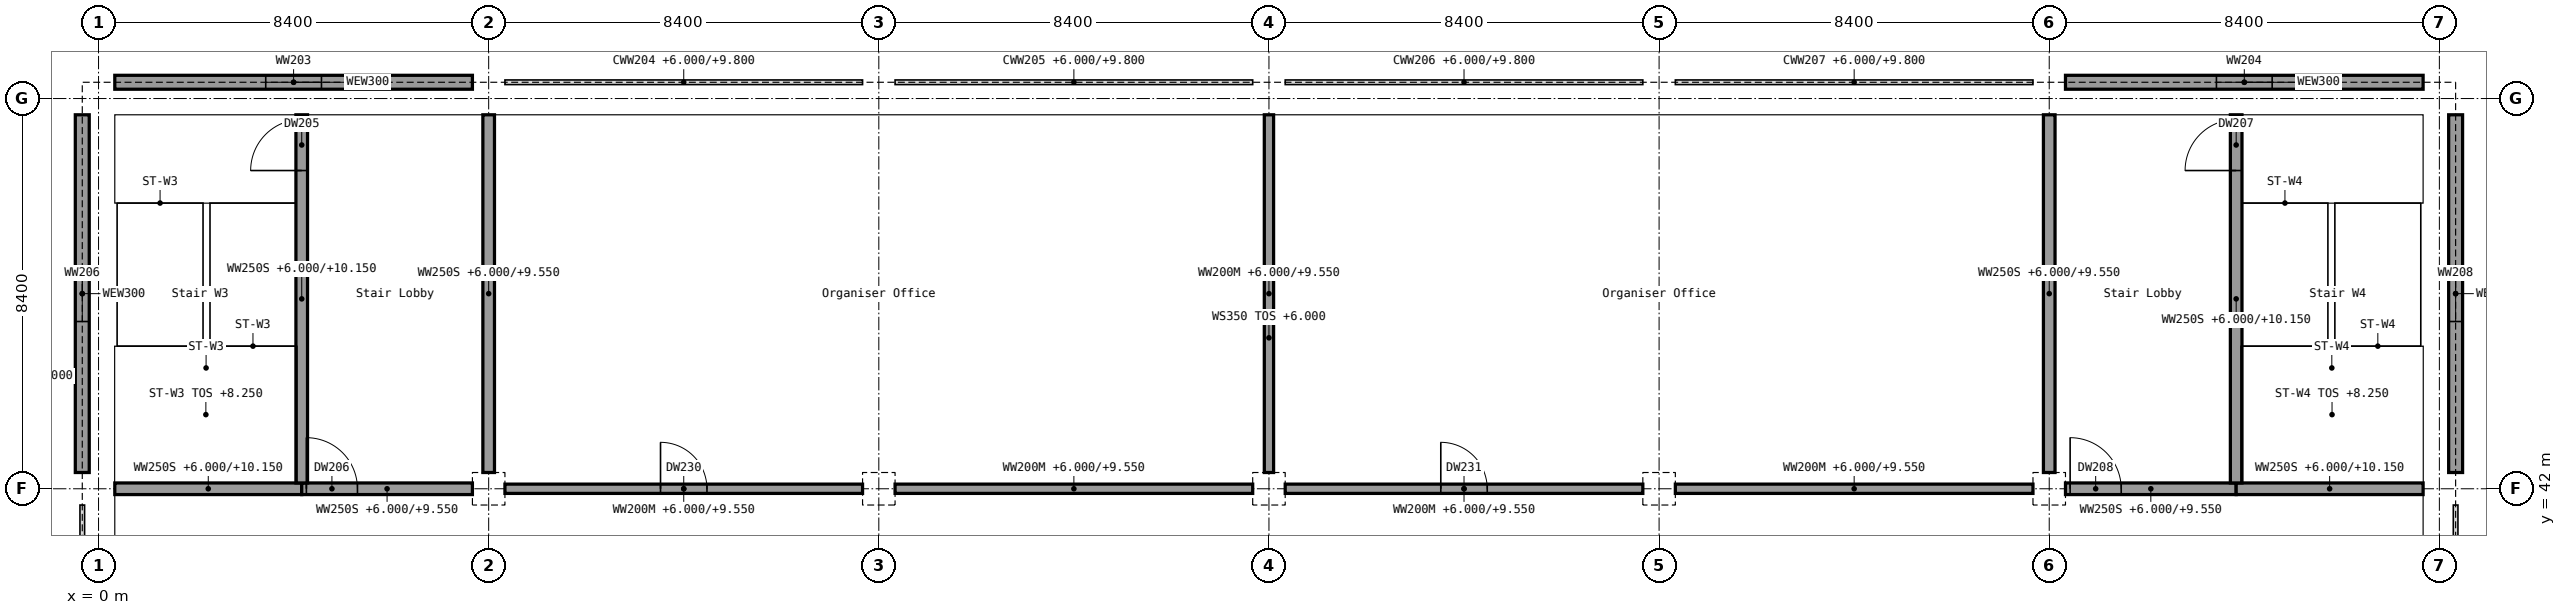
"""IFC4 building model, lengths in metres.
Left out: names, types, materials, properties, quantities, classifications, styles, units other than length and angle.
Written with IfcOpenShell. Run it as: python <this file> out.ifc"""

import sys

from ifc_helpers import new_model, si_unit, direction, frame, frame_2d, origin, origin_2d, place, context, subcontext, project, spatial, rectangle, extrude, element, fill, save


model = new_model("IFC4")
c1 = context("Model", 3, precision=1e-05, world=origin(), true_north=direction((0.0, 1.0)))
c2 = subcontext(c1, "Body", "Model", "MODEL_VIEW")
j1 = project(units=[si_unit("LENGTHUNIT", "METRE"), si_unit("PLANEANGLEUNIT", "RADIAN")], contexts=[c1])
p1 = place(None, origin())
s1 = spatial("IfcSite", under=j1, at=p1, CompositionType="ELEMENT")
p2 = place(p1, origin())
s2 = spatial("IfcBuilding", under=s1, at=p2, CompositionType="ELEMENT")
p3 = place(p2, frame((0.0, 0.0, 6.0)))
s3 = spatial("IfcBuildingStorey", under=s2, at=p3, CompositionType="ELEMENT", Elevation=6.0)
for number, where, z_axis, x_axis in (
    (1, (0.0, 42.0, 0.0), (0.0, 0.0, 1.0), (1.0, 0.0, 0.0)),
    (2, (0.0, 50.4, 0.0), (0.0, 0.0, 1.0), (1.0, 0.0, 0.0)),
    (3, (8.4, 42.0, 0.0), (0.0, 0.0, 1.0), (1.0, 0.0, 0.0)),
    (4, (8.4, 50.4, 0.0), (0.0, 0.0, 1.0), (1.0, 0.0, 0.0)),
    (5, (16.8, 42.0, 0.0), (0.0, 0.0, 1.0), (1.0, 0.0, 0.0)),
    (6, (16.8, 50.4, 0.0), (0.0, 0.0, 1.0), (1.0, 0.0, 0.0)),
    (7, (25.2, 42.0, 0.0), (0.0, 0.0, 1.0), (1.0, 0.0, 0.0)),
    (8, (25.2, 50.4, 0.0), (0.0, 0.0, 1.0), (1.0, 0.0, 0.0)),
    (9, (33.6, 42.0, 0.0), (0.0, 0.0, 1.0), (1.0, 0.0, 0.0)),
    (10, (33.6, 50.4, 0.0), (0.0, 0.0, 1.0), (1.0, 0.0, 0.0)),
    (11, (42.0, 42.0, 0.0), (0.0, 0.0, 1.0), (1.0, 0.0, 0.0)),
    (12, (42.0, 50.4, 0.0), (0.0, 0.0, 1.0), (1.0, 0.0, 0.0)),
    (13, (50.4, 42.0, 0.0), (0.0, 0.0, 1.0), (1.0, 0.0, 0.0)),
    (14, (50.4, 50.4, 0.0), (0.0, 0.0, 1.0), (1.0, 0.0, 0.0)),
):
    element("IfcColumn", number, at=place(p3, frame(where, z_axis=z_axis, x_axis=x_axis)), inside=s3, PredefinedType="COLUMN", context=c2, shape_type="SweptSolid", body=[
        extrude(rectangle(XDim=0.7, YDim=0.7, at=origin_2d()), origin(), (0.0, 0.0, 1.0), 4.5),
    ])
p4 = place(p3, frame((0.35, 50.75, 0.0), z_axis=(0.0, 0.0, 1.0), x_axis=(1.0, 0.0, 0.0)))
e15 = element("IfcWall", 15, at=p4, inside=s3, PredefinedType="SOLIDWALL", context=c2, shape_type="SweptSolid", body=[
    extrude(rectangle(XDim=7.7, YDim=0.3, at=frame_2d((3.85, 0.0))), origin(), (0.0, 0.0, 1.0), 3.8),
])
p5 = place(p4, frame((3.25, 0.0, 1.0)))
e16 = element("IfcOpeningElement", 16, at=p5, cuts=e15, PredefinedType="OPENING", context=c2, shape_type="SweptSolid", body=[
    extrude(rectangle(XDim=1.2, YDim=1.5, at=frame_2d((0.6, 0.75))), frame((0.0, 0.15, 0.0), z_axis=(0.0, -1.0, 0.0), x_axis=(1.0, 0.0, 0.0)), (0.0, 0.0, 1.0), 0.3),
])
p6 = place(p3, frame((42.35, 50.75, 0.0), z_axis=(0.0, 0.0, 1.0), x_axis=(1.0, 0.0, 0.0)))
e17 = element("IfcWall", 17, at=p6, inside=s3, PredefinedType="SOLIDWALL", context=c2, shape_type="SweptSolid", body=[
    extrude(rectangle(XDim=7.7, YDim=0.3, at=frame_2d((3.85, 0.0))), origin(), (0.0, 0.0, 1.0), 3.8),
])
p7 = place(p6, frame((3.25, 0.0, 1.0)))
e18 = element("IfcOpeningElement", 18, at=p7, cuts=e17, PredefinedType="OPENING", context=c2, shape_type="SweptSolid", body=[
    extrude(rectangle(XDim=1.2, YDim=1.5, at=frame_2d((0.6, 0.75))), frame((0.0, 0.15, 0.0), z_axis=(0.0, -1.0, 0.0), x_axis=(1.0, 0.0, 0.0)), (0.0, 0.0, 1.0), 0.3),
])
p8 = place(p3, frame((-0.35, 42.35, 0.0), z_axis=(0.0, 0.0, 1.0), x_axis=(0.0, 1.0, 0.0)))
e19 = element("IfcWall", 19, at=p8, inside=s3, PredefinedType="SOLIDWALL", context=c2, shape_type="SweptSolid", body=[
    extrude(rectangle(XDim=7.7, YDim=0.3, at=frame_2d((3.85, 0.0))), origin(), (0.0, 0.0, 1.0), 3.8),
])
p9 = place(p8, frame((3.25, 0.0, 1.0)))
e20 = element("IfcOpeningElement", 20, at=p9, cuts=e19, PredefinedType="OPENING", context=c2, shape_type="SweptSolid", body=[
    extrude(rectangle(XDim=1.2, YDim=1.5, at=frame_2d((0.6, 0.75))), frame((0.0, 0.15, 0.0), z_axis=(0.0, -1.0, 0.0), x_axis=(1.0, 0.0, 0.0)), (0.0, 0.0, 1.0), 0.3),
])
p10 = place(p3, frame((50.75, 42.35, 0.0), z_axis=(0.0, 0.0, 1.0), x_axis=(0.0, 1.0, 0.0)))
e21 = element("IfcWall", 21, at=p10, inside=s3, PredefinedType="SOLIDWALL", context=c2, shape_type="SweptSolid", body=[
    extrude(rectangle(XDim=7.7, YDim=0.3, at=frame_2d((3.85, 0.0))), origin(), (0.0, 0.0, 1.0), 3.8),
])
p11 = place(p10, frame((3.25, 0.0, 1.0)))
e22 = element("IfcOpeningElement", 22, at=p11, cuts=e21, PredefinedType="OPENING", context=c2, shape_type="SweptSolid", body=[
    extrude(rectangle(XDim=1.2, YDim=1.5, at=frame_2d((0.6, 0.75))), frame((0.0, 0.15, 0.0), z_axis=(0.0, -1.0, 0.0), x_axis=(1.0, 0.0, 0.0)), (0.0, 0.0, 1.0), 0.3),
])
p12 = place(p3, frame((0.35, 42.0, 0.0), z_axis=(0.0, 0.0, 1.0), x_axis=(1.0, 0.0, 0.0)))
e23 = element("IfcWall", 23, at=p12, inside=s3, PredefinedType="SHEAR", context=c2, shape_type="SweptSolid", body=[
    extrude(rectangle(XDim=4.025, YDim=0.25, at=frame_2d((2.012, 0.0))), origin(), (0.0, 0.0, 1.0), 4.15),
])
p13 = place(p3, frame((4.375, 42.0, 0.0), z_axis=(0.0, 0.0, 1.0), x_axis=(1.0, 0.0, 0.0)))
e24 = element("IfcWall", 24, at=p13, inside=s3, PredefinedType="SHEAR", context=c2, shape_type="SweptSolid", body=[
    extrude(rectangle(XDim=3.675, YDim=0.25, at=frame_2d((1.837, 0.0))), origin(), (0.0, 0.0, 1.0), 3.55),
])
p14 = place(p13, frame((0.1, 0.0, 0.0)))
e25 = element("IfcOpeningElement", 25, at=p14, cuts=e24, PredefinedType="OPENING", context=c2, shape_type="SweptSolid", body=[
    extrude(rectangle(XDim=1.1, YDim=2.1, at=frame_2d((0.55, 1.05))), frame((0.0, 0.125, 0.0), z_axis=(0.0, -1.0, 0.0), x_axis=(1.0, 0.0, 0.0)), (0.0, 0.0, 1.0), 0.25),
])
p15 = place(p3, frame((8.75, 42.0, 0.0), z_axis=(0.0, 0.0, 1.0), x_axis=(1.0, 0.0, 0.0)))
e26 = element("IfcWall", 26, at=p15, inside=s3, PredefinedType="PARTITIONING", context=c2, shape_type="SweptSolid", body=[
    extrude(rectangle(XDim=7.7, YDim=0.2, at=frame_2d((3.85, 0.0))), origin(), (0.0, 0.0, 1.0), 3.55),
])
p16 = place(p15, frame((3.35, 0.0, 0.0)))
e27 = element("IfcOpeningElement", 27, at=p16, cuts=e26, PredefinedType="OPENING", context=c2, shape_type="SweptSolid", body=[
    extrude(rectangle(XDim=1.0, YDim=2.1, at=frame_2d((0.5, 1.05))), frame((0.0, 0.1, 0.0), z_axis=(0.0, -1.0, 0.0), x_axis=(1.0, 0.0, 0.0)), (0.0, 0.0, 1.0), 0.2),
])
p17 = place(p3, frame((17.15, 42.0, 0.0), z_axis=(0.0, 0.0, 1.0), x_axis=(1.0, 0.0, 0.0)))
e28 = element("IfcWall", 28, at=p17, inside=s3, PredefinedType="PARTITIONING", context=c2, shape_type="SweptSolid", body=[
    extrude(rectangle(XDim=7.7, YDim=0.2, at=frame_2d((3.85, 0.0))), origin(), (0.0, 0.0, 1.0), 3.55),
])
p18 = place(p3, frame((25.55, 42.0, 0.0), z_axis=(0.0, 0.0, 1.0), x_axis=(1.0, 0.0, 0.0)))
e29 = element("IfcWall", 29, at=p18, inside=s3, PredefinedType="PARTITIONING", context=c2, shape_type="SweptSolid", body=[
    extrude(rectangle(XDim=7.7, YDim=0.2, at=frame_2d((3.85, 0.0))), origin(), (0.0, 0.0, 1.0), 3.55),
])
p19 = place(p18, frame((3.35, 0.0, 0.0)))
e30 = element("IfcOpeningElement", 30, at=p19, cuts=e29, PredefinedType="OPENING", context=c2, shape_type="SweptSolid", body=[
    extrude(rectangle(XDim=1.0, YDim=2.1, at=frame_2d((0.5, 1.05))), frame((0.0, 0.1, 0.0), z_axis=(0.0, -1.0, 0.0), x_axis=(1.0, 0.0, 0.0)), (0.0, 0.0, 1.0), 0.2),
])
p20 = place(p3, frame((33.95, 42.0, 0.0), z_axis=(0.0, 0.0, 1.0), x_axis=(1.0, 0.0, 0.0)))
e31 = element("IfcWall", 31, at=p20, inside=s3, PredefinedType="PARTITIONING", context=c2, shape_type="SweptSolid", body=[
    extrude(rectangle(XDim=7.7, YDim=0.2, at=frame_2d((3.85, 0.0))), origin(), (0.0, 0.0, 1.0), 3.55),
])
p21 = place(p3, frame((42.35, 42.0, 0.0), z_axis=(0.0, 0.0, 1.0), x_axis=(1.0, 0.0, 0.0)))
e32 = element("IfcWall", 32, at=p21, inside=s3, PredefinedType="SHEAR", context=c2, shape_type="SweptSolid", body=[
    extrude(rectangle(XDim=3.675, YDim=0.25, at=frame_2d((1.837, 0.0))), origin(), (0.0, 0.0, 1.0), 3.55),
])
p22 = place(p21, frame((0.1, 0.0, 0.0)))
e33 = element("IfcOpeningElement", 33, at=p22, cuts=e32, PredefinedType="OPENING", context=c2, shape_type="SweptSolid", body=[
    extrude(rectangle(XDim=1.1, YDim=2.1, at=frame_2d((0.55, 1.05))), frame((0.0, 0.125, 0.0), z_axis=(0.0, -1.0, 0.0), x_axis=(1.0, 0.0, 0.0)), (0.0, 0.0, 1.0), 0.25),
])
p23 = place(p3, frame((46.025, 42.0, 0.0), z_axis=(0.0, 0.0, 1.0), x_axis=(1.0, 0.0, 0.0)))
e34 = element("IfcWall", 34, at=p23, inside=s3, PredefinedType="SHEAR", context=c2, shape_type="SweptSolid", body=[
    extrude(rectangle(XDim=4.025, YDim=0.25, at=frame_2d((2.013, 0.0))), origin(), (0.0, 0.0, 1.0), 4.15),
])
p24 = place(p3, frame((4.375, 42.125, 0.0), z_axis=(0.0, 0.0, 1.0), x_axis=(0.0, 1.0, 0.0)))
e35 = element("IfcWall", 35, at=p24, inside=s3, PredefinedType="SHEAR", context=c2, shape_type="SweptSolid", body=[
    extrude(rectangle(XDim=7.925, YDim=0.25, at=frame_2d((3.962, 0.0))), origin(), (0.0, 0.0, 1.0), 4.15),
])
p25 = place(p24, frame((6.725, 0.0, 0.0)))
e36 = element("IfcOpeningElement", 36, at=p25, cuts=e35, PredefinedType="OPENING", context=c2, shape_type="SweptSolid", body=[
    extrude(rectangle(XDim=1.1, YDim=2.1, at=frame_2d((0.55, 1.05))), frame((0.0, 0.125, 0.0), z_axis=(0.0, -1.0, 0.0), x_axis=(1.0, 0.0, 0.0)), (0.0, 0.0, 1.0), 0.25),
])
p26 = place(p3, frame((8.4, 42.35, 0.0), z_axis=(0.0, 0.0, 1.0), x_axis=(0.0, 1.0, 0.0)))
e37 = element("IfcWall", 37, at=p26, inside=s3, PredefinedType="SHEAR", context=c2, shape_type="SweptSolid", body=[
    extrude(rectangle(XDim=7.7, YDim=0.25, at=frame_2d((3.85, 0.0))), origin(), (0.0, 0.0, 1.0), 3.55),
])
p27 = place(p3, frame((25.2, 42.35, 0.0), z_axis=(0.0, 0.0, 1.0), x_axis=(0.0, 1.0, 0.0)))
e38 = element("IfcWall", 38, at=p27, inside=s3, PredefinedType="PARTITIONING", context=c2, shape_type="SweptSolid", body=[
    extrude(rectangle(XDim=7.7, YDim=0.2, at=frame_2d((3.85, 0.0))), origin(), (0.0, 0.0, 1.0), 3.55),
])
p28 = place(p3, frame((42.0, 42.35, 0.0), z_axis=(0.0, 0.0, 1.0), x_axis=(0.0, 1.0, 0.0)))
e39 = element("IfcWall", 39, at=p28, inside=s3, PredefinedType="SHEAR", context=c2, shape_type="SweptSolid", body=[
    extrude(rectangle(XDim=7.7, YDim=0.25, at=frame_2d((3.85, 0.0))), origin(), (0.0, 0.0, 1.0), 3.55),
])
p29 = place(p3, frame((46.025, 42.125, 0.0), z_axis=(0.0, 0.0, 1.0), x_axis=(0.0, 1.0, 0.0)))
e40 = element("IfcWall", 40, at=p29, inside=s3, PredefinedType="SHEAR", context=c2, shape_type="SweptSolid", body=[
    extrude(rectangle(XDim=7.925, YDim=0.25, at=frame_2d((3.962, 0.0))), origin(), (0.0, 0.0, 1.0), 4.15),
])
p30 = place(p29, frame((6.725, 0.0, 0.0)))
e41 = element("IfcOpeningElement", 41, at=p30, cuts=e40, PredefinedType="OPENING", context=c2, shape_type="SweptSolid", body=[
    extrude(rectangle(XDim=1.1, YDim=2.1, at=frame_2d((0.55, 1.05))), frame((0.0, 0.125, 0.0), z_axis=(0.0, -1.0, 0.0), x_axis=(1.0, 0.0, 0.0)), (0.0, 0.0, 1.0), 0.25),
])
p31 = place(p5, origin())
e42 = element("IfcWindow", 42, at=p31, inside=s3, PartitioningType="SINGLE_PANEL", PredefinedType="WINDOW", context=c2, shape_type="SweptSolid", body=[
    extrude(rectangle(XDim=1.2, YDim=1.5, at=frame_2d((0.6, 0.75))), frame((0.0, 0.03, 0.0), z_axis=(0.0, -1.0, 0.0), x_axis=(1.0, 0.0, 0.0)), (0.0, 0.0, 1.0), 0.06),
])
fill(e16, e42)
p32 = place(p7, origin())
e43 = element("IfcWindow", 43, at=p32, inside=s3, PartitioningType="SINGLE_PANEL", PredefinedType="WINDOW", context=c2, shape_type="SweptSolid", body=[
    extrude(rectangle(XDim=1.2, YDim=1.5, at=frame_2d((0.6, 0.75))), frame((0.0, 0.03, 0.0), z_axis=(0.0, -1.0, 0.0), x_axis=(1.0, 0.0, 0.0)), (0.0, 0.0, 1.0), 0.06),
])
fill(e18, e43)
p33 = place(p9, origin())
e44 = element("IfcWindow", 44, at=p33, inside=s3, PartitioningType="SINGLE_PANEL", PredefinedType="WINDOW", context=c2, shape_type="SweptSolid", body=[
    extrude(rectangle(XDim=1.2, YDim=1.5, at=frame_2d((0.6, 0.75))), frame((0.0, 0.03, 0.0), z_axis=(0.0, -1.0, 0.0), x_axis=(1.0, 0.0, 0.0)), (0.0, 0.0, 1.0), 0.06),
])
fill(e20, e44)
p34 = place(p11, origin())
e45 = element("IfcWindow", 45, at=p34, inside=s3, PartitioningType="SINGLE_PANEL", PredefinedType="WINDOW", context=c2, shape_type="SweptSolid", body=[
    extrude(rectangle(XDim=1.2, YDim=1.5, at=frame_2d((0.6, 0.75))), frame((0.0, 0.03, 0.0), z_axis=(0.0, -1.0, 0.0), x_axis=(1.0, 0.0, 0.0)), (0.0, 0.0, 1.0), 0.06),
])
fill(e22, e45)
p35 = place(p25, origin())
e46 = element("IfcDoor", 46, at=p35, inside=s3, OperationType="SINGLE_SWING_RIGHT", PredefinedType="DOOR", context=c2, shape_type="SweptSolid", body=[
    extrude(rectangle(XDim=1.1, YDim=2.1, at=frame_2d((0.55, 1.05))), frame((0.0, 0.025, 0.0), z_axis=(0.0, -1.0, 0.0), x_axis=(1.0, 0.0, 0.0)), (0.0, 0.0, 1.0), 0.05),
])
fill(e36, e46)
p36 = place(p14, origin())
e47 = element("IfcDoor", 47, at=p36, inside=s3, OperationType="SINGLE_SWING_LEFT", PredefinedType="DOOR", context=c2, shape_type="SweptSolid", body=[
    extrude(rectangle(XDim=1.1, YDim=2.1, at=frame_2d((0.55, 1.05))), frame((0.0, 0.025, 0.0), z_axis=(0.0, -1.0, 0.0), x_axis=(1.0, 0.0, 0.0)), (0.0, 0.0, 1.0), 0.05),
])
fill(e25, e47)
p37 = place(p30, origin())
e48 = element("IfcDoor", 48, at=p37, inside=s3, OperationType="SINGLE_SWING_RIGHT", PredefinedType="DOOR", context=c2, shape_type="SweptSolid", body=[
    extrude(rectangle(XDim=1.1, YDim=2.1, at=frame_2d((0.55, 1.05))), frame((0.0, 0.025, 0.0), z_axis=(0.0, -1.0, 0.0), x_axis=(1.0, 0.0, 0.0)), (0.0, 0.0, 1.0), 0.05),
])
fill(e41, e48)
p38 = place(p22, origin())
e49 = element("IfcDoor", 49, at=p38, inside=s3, OperationType="SINGLE_SWING_LEFT", PredefinedType="DOOR", context=c2, shape_type="SweptSolid", body=[
    extrude(rectangle(XDim=1.1, YDim=2.1, at=frame_2d((0.55, 1.05))), frame((0.0, 0.025, 0.0), z_axis=(0.0, -1.0, 0.0), x_axis=(1.0, 0.0, 0.0)), (0.0, 0.0, 1.0), 0.05),
])
fill(e33, e49)
p39 = place(p16, origin())
e50 = element("IfcDoor", 50, at=p39, inside=s3, OperationType="SINGLE_SWING_LEFT", PredefinedType="DOOR", context=c2, shape_type="SweptSolid", body=[
    extrude(rectangle(XDim=1.0, YDim=2.1, at=frame_2d((0.5, 1.05))), frame((0.0, 0.025, 0.0), z_axis=(0.0, -1.0, 0.0), x_axis=(1.0, 0.0, 0.0)), (0.0, 0.0, 1.0), 0.05),
])
fill(e27, e50)
p40 = place(p19, origin())
e51 = element("IfcDoor", 51, at=p40, inside=s3, OperationType="SINGLE_SWING_LEFT", PredefinedType="DOOR", context=c2, shape_type="SweptSolid", body=[
    extrude(rectangle(XDim=1.0, YDim=2.1, at=frame_2d((0.5, 1.05))), frame((0.0, 0.025, 0.0), z_axis=(0.0, -1.0, 0.0), x_axis=(1.0, 0.0, 0.0)), (0.0, 0.0, 1.0), 0.05),
])
fill(e30, e51)
save(model, sys.argv[1])
